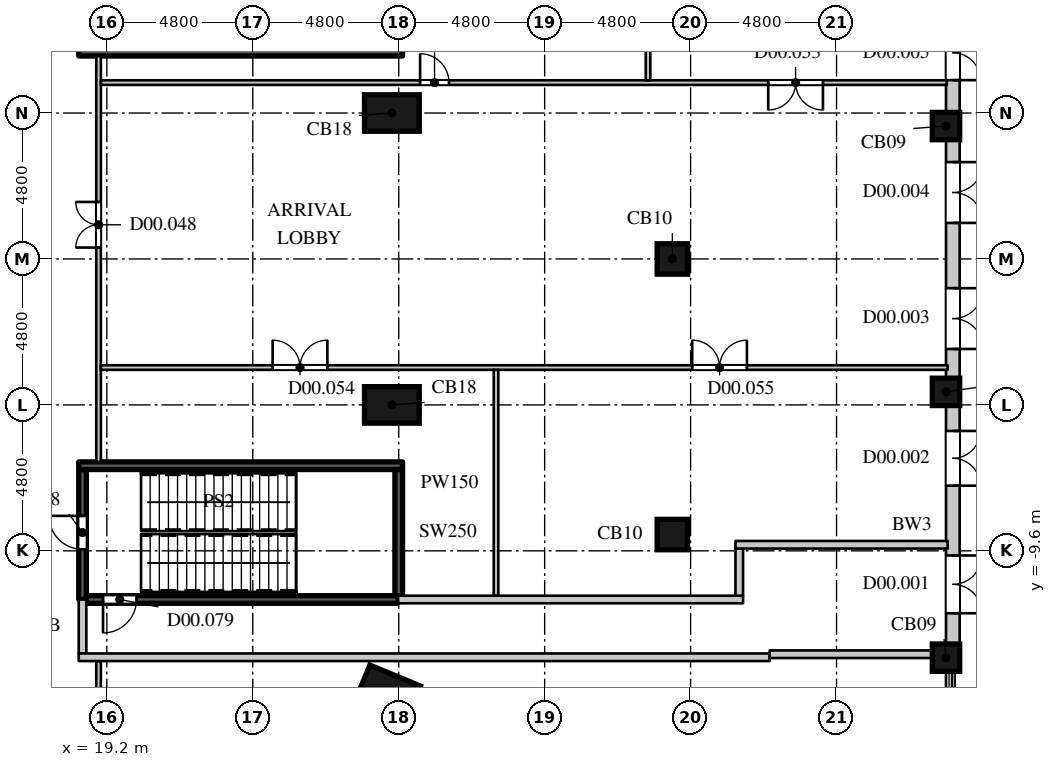
"""IFC4 building model, lengths in metres.
Left out: names, types, materials, properties, quantities, classifications, styles, units other than length and angle.
Written with IfcOpenShell. Run it as: python <this file> out.ifc"""

import sys

from ifc_helpers import new_model, si_unit, direction, frame, frame_2d, origin, origin_2d, place, context, subcontext, project, spatial, rectangle, extrude, element, fill, save


model = new_model("IFC4")
c1 = context("Model", 3, precision=1e-05, world=origin(), true_north=direction((0.0, 1.0)))
c2 = subcontext(c1, "Body", "Model", "MODEL_VIEW")
j1 = project(units=[si_unit("LENGTHUNIT", "METRE"), si_unit("PLANEANGLEUNIT", "RADIAN")], contexts=[c1])
p1 = place(None, origin())
s1 = spatial("IfcSite", under=j1, at=p1, CompositionType="ELEMENT")
p2 = place(p1, origin())
s2 = spatial("IfcBuilding", under=s1, at=p2, CompositionType="ELEMENT")
p3 = place(p2, origin())
s3 = spatial("IfcBuildingStorey", under=s2, at=p3, CompositionType="ELEMENT", Elevation=0.0)
p4 = place(p3, frame((28.454, -14.257, 0.0), z_axis=(0.0, 0.0, 1.0), x_axis=(0.382683496864, 0.923879505795, 0.0)))
e1 = element("IfcColumn", 1, at=p4, inside=s3, PredefinedType="COLUMN", context=c2, shape_type="SweptSolid", body=[
    extrude(rectangle(XDim=1.2, YDim=1.8, at=origin_2d()), origin(), (0.0, 0.0, 1.0), 6.0),
])
p5 = place(p3, frame((46.8, -13.114, 0.0), z_axis=(0.0, 0.0, 1.0), x_axis=(1.0, 0.0, 0.0)))
e2 = element("IfcColumn", 2, at=p5, inside=s3, PredefinedType="COLUMN", context=c2, shape_type="SweptSolid", body=[
    extrude(rectangle(XDim=0.9, YDim=0.9, at=origin_2d()), origin(), (0.0, 0.0, 1.0), 6.0),
])
p6 = place(p3, frame((37.8, -9.064, 0.0), z_axis=(0.0, 0.0, 1.0), x_axis=(1.0, 0.0, 0.0)))
e3 = element("IfcColumn", 3, at=p6, inside=s3, PredefinedType="COLUMN", context=c2, shape_type="SweptSolid", body=[
    extrude(rectangle(XDim=1.0, YDim=1.0, at=origin_2d()), origin(), (0.0, 0.0, 1.0), 6.0),
])
p7 = place(p3, frame((28.575, -4.8, 0.0), z_axis=(0.0, 0.0, 1.0), x_axis=(0.0, 1.0, 0.0)))
e4 = element("IfcColumn", 4, at=p7, inside=s3, PredefinedType="COLUMN", context=c2, shape_type="SweptSolid", body=[
    extrude(rectangle(XDim=1.2, YDim=1.8, at=origin_2d()), origin(), (0.0, 0.0, 1.0), 6.0),
])
p8 = place(p3, frame((46.8, -4.371, 0.0), z_axis=(0.0, 0.0, 1.0), x_axis=(1.0, 0.0, 0.0)))
e5 = element("IfcColumn", 5, at=p8, inside=s3, PredefinedType="COLUMN", context=c2, shape_type="SweptSolid", body=[
    extrude(rectangle(XDim=0.9, YDim=0.9, at=origin_2d()), origin(), (0.0, 0.0, 1.0), 6.0),
])
p9 = place(p3, frame((37.8, 0.0, 0.0), z_axis=(0.0, 0.0, 1.0), x_axis=(1.0, 0.0, 0.0)))
e6 = element("IfcColumn", 6, at=p9, inside=s3, PredefinedType="COLUMN", context=c2, shape_type="SweptSolid", body=[
    extrude(rectangle(XDim=1.0, YDim=1.0, at=origin_2d()), origin(), (0.0, 0.0, 1.0), 6.0),
])
p10 = place(p3, frame((46.8, 4.371, 0.0), z_axis=(0.0, 0.0, 1.0), x_axis=(1.0, 0.0, 0.0)))
e7 = element("IfcColumn", 7, at=p10, inside=s3, PredefinedType="COLUMN", context=c2, shape_type="SweptSolid", body=[
    extrude(rectangle(XDim=0.9, YDim=0.9, at=origin_2d()), origin(), (0.0, 0.0, 1.0), 6.0),
])
p11 = place(p3, frame((28.575, 4.8, 0.0), z_axis=(0.0, 0.0, 1.0), x_axis=(0.0, 1.0, 0.0)))
e8 = element("IfcColumn", 8, at=p11, inside=s3, PredefinedType="COLUMN", context=c2, shape_type="SweptSolid", body=[
    extrude(rectangle(XDim=1.2, YDim=1.8, at=origin_2d()), origin(), (0.0, 0.0, 1.0), 6.0),
])
p12 = place(p3, frame((47.025, -12.664, 0.0), z_axis=(0.0, 0.0, 1.0), x_axis=(0.0, 1.0, 0.0)))
e9 = element("IfcWall", 9, at=p12, inside=s3, PredefinedType="ELEMENTEDWALL", context=c2, shape_type="SweptSolid", body=[
    extrude(rectangle(XDim=7.842, YDim=0.45, at=frame_2d((3.921, 0.0))), origin(), (0.0, 0.0, 1.0), 4.8),
])
p13 = place(p12, frame((1.01, 0.0, 0.0)))
e10 = element("IfcOpeningElement", 10, at=p13, cuts=e9, PredefinedType="OPENING", context=c2, shape_type="SweptSolid", body=[
    extrude(rectangle(XDim=1.9, YDim=2.7, at=frame_2d((0.95, 1.35))), frame((0.0, 0.235, 0.0), z_axis=(0.0, -1.0, 0.0), x_axis=(1.0, 0.0, 0.0)), (0.0, 0.0, 1.0), 0.47),
])
p14 = place(p12, frame((5.207, 0.0, 0.0)))
e11 = element("IfcOpeningElement", 11, at=p14, cuts=e9, PredefinedType="OPENING", context=c2, shape_type="SweptSolid", body=[
    extrude(rectangle(XDim=1.8, YDim=2.7, at=frame_2d((0.9, 1.35))), frame((0.0, 0.235, 0.0), z_axis=(0.0, -1.0, 0.0), x_axis=(1.0, 0.0, 0.0)), (0.0, 0.0, 1.0), 0.47),
])
p15 = place(p3, frame((47.025, -3.921, 0.0), z_axis=(0.0, 0.0, 1.0), x_axis=(0.0, 1.0, 0.0)))
e12 = element("IfcWall", 12, at=p15, inside=s3, PredefinedType="ELEMENTEDWALL", context=c2, shape_type="SweptSolid", body=[
    extrude(rectangle(XDim=7.842, YDim=0.45, at=frame_2d((3.921, 0.0))), origin(), (0.0, 0.0, 1.0), 4.8),
])
p16 = place(p15, frame((0.961, 0.0, 0.0)))
e13 = element("IfcOpeningElement", 13, at=p16, cuts=e12, PredefinedType="OPENING", context=c2, shape_type="SweptSolid", body=[
    extrude(rectangle(XDim=2.0, YDim=2.7, at=frame_2d((1.0, 1.35))), frame((0.0, 0.235, 0.0), z_axis=(0.0, -1.0, 0.0), x_axis=(1.0, 0.0, 0.0)), (0.0, 0.0, 1.0), 0.47),
])
p17 = place(p15, frame((5.107, 0.0, 0.0)))
e14 = element("IfcOpeningElement", 14, at=p17, cuts=e12, PredefinedType="OPENING", context=c2, shape_type="SweptSolid", body=[
    extrude(rectangle(XDim=2.0, YDim=2.7, at=frame_2d((1.0, 1.35))), frame((0.0, 0.235, 0.0), z_axis=(0.0, -1.0, 0.0), x_axis=(1.0, 0.0, 0.0)), (0.0, 0.0, 1.0), 0.47),
])
p18 = place(p3, frame((47.025, 4.821, 0.0), z_axis=(0.0, 0.0, 1.0), x_axis=(0.0, 1.0, 0.0)))
e15 = element("IfcWall", 15, at=p18, inside=s3, PredefinedType="ELEMENTEDWALL", context=c2, shape_type="SweptSolid", body=[
    extrude(rectangle(XDim=7.842, YDim=0.45, at=frame_2d((3.921, 0.0))), origin(), (0.0, 0.0, 1.0), 4.8),
])
p19 = place(p18, frame((1.061, 0.0, 0.0)))
e16 = element("IfcOpeningElement", 16, at=p19, cuts=e15, PredefinedType="OPENING", context=c2, shape_type="SweptSolid", body=[
    extrude(rectangle(XDim=1.8, YDim=2.7, at=frame_2d((0.9, 1.35))), frame((0.0, 0.235, 0.0), z_axis=(0.0, -1.0, 0.0), x_axis=(1.0, 0.0, 0.0)), (0.0, 0.0, 1.0), 0.47),
])
p20 = place(p18, frame((5.157, 0.0, 0.0)))
e17 = element("IfcOpeningElement", 17, at=p20, cuts=e15, PredefinedType="OPENING", context=c2, shape_type="SweptSolid", body=[
    extrude(rectangle(XDim=1.9, YDim=2.7, at=frame_2d((0.95, 1.35))), frame((0.0, 0.235, 0.0), z_axis=(0.0, -1.0, 0.0), x_axis=(1.0, 0.0, 0.0)), (0.0, 0.0, 1.0), 0.47),
])
p21 = place(p3, frame((18.928, -29.9, 0.0), z_axis=(0.0, 0.0, 1.0), x_axis=(0.0, 1.0, 0.0)))
e18 = element("IfcWall", 18, at=p21, inside=s3, PredefinedType="PARTITIONING", context=c2, shape_type="SweptSolid", body=[
    extrude(rectangle(XDim=16.675, YDim=0.15, at=frame_2d((8.337, 0.0))), origin(), (0.0, 0.0, 1.0), 5.65),
])
p22 = place(p3, frame((18.928, -6.675, 0.0), z_axis=(0.0, 0.0, 1.0), x_axis=(0.0, 1.0, 0.0)))
e19 = element("IfcWall", 19, at=p22, inside=s3, PredefinedType="PARTITIONING", context=c2, shape_type="SweptSolid", body=[
    extrude(rectangle(XDim=13.35, YDim=0.15, at=frame_2d((6.675, 0.0))), origin(), (0.0, 0.0, 1.0), 5.65),
])
p23 = place(p22, frame((7.05, 0.0, 0.0)))
e20 = element("IfcOpeningElement", 20, at=p23, cuts=e19, PredefinedType="OPENING", context=c2, shape_type="SweptSolid", body=[
    extrude(rectangle(XDim=1.5, YDim=2.2, at=frame_2d((0.75, 1.1))), frame((0.0, 0.085, 0.0), z_axis=(0.0, -1.0, 0.0), x_axis=(1.0, 0.0, 0.0)), (0.0, 0.0, 1.0), 0.17),
])
p24 = place(p3, frame((19.003, -3.571, 0.0), z_axis=(0.0, 0.0, 1.0), x_axis=(1.0, 0.0, 0.0)))
e21 = element("IfcWall", 21, at=p24, inside=s3, PredefinedType="PARTITIONING", context=c2, shape_type="SweptSolid", body=[
    extrude(rectangle(XDim=27.852, YDim=0.15, at=frame_2d((13.926, 0.0))), origin(), (0.0, 0.0, 1.0), 5.65),
])
p25 = place(p24, frame((5.65, 0.0, 0.0)))
e22 = element("IfcOpeningElement", 22, at=p25, cuts=e21, PredefinedType="OPENING", context=c2, shape_type="SweptSolid", body=[
    extrude(rectangle(XDim=1.8, YDim=2.4, at=frame_2d((0.9, 1.2))), frame((0.0, 0.085, 0.0), z_axis=(0.0, -1.0, 0.0), x_axis=(1.0, 0.0, 0.0)), (0.0, 0.0, 1.0), 0.17),
])
p26 = place(p24, frame((19.45, 0.0, 0.0)))
e23 = element("IfcOpeningElement", 23, at=p26, cuts=e21, PredefinedType="OPENING", context=c2, shape_type="SweptSolid", body=[
    extrude(rectangle(XDim=1.8, YDim=2.4, at=frame_2d((0.9, 1.2))), frame((0.0, 0.085, 0.0), z_axis=(0.0, -1.0, 0.0), x_axis=(1.0, 0.0, 0.0)), (0.0, 0.0, 1.0), 0.17),
])
p27 = place(p3, frame((19.003, 5.8, 0.0), z_axis=(0.0, 0.0, 1.0), x_axis=(1.0, 0.0, 0.0)))
e24 = element("IfcWall", 24, at=p27, inside=s3, PredefinedType="PARTITIONING", context=c2, shape_type="SweptSolid", body=[
    extrude(rectangle(XDim=27.822, YDim=0.15, at=frame_2d((13.911, 0.0))), origin(), (0.0, 0.0, 1.0), 5.65),
])
p28 = place(p27, frame((21.95, 0.0, 0.0)))
e25 = element("IfcOpeningElement", 25, at=p28, cuts=e24, PredefinedType="OPENING", context=c2, shape_type="SweptSolid", body=[
    extrude(rectangle(XDim=1.8, YDim=2.4, at=frame_2d((0.9, 1.2))), frame((0.0, 0.085, 0.0), z_axis=(0.0, -1.0, 0.0), x_axis=(1.0, 0.0, 0.0)), (0.0, 0.0, 1.0), 0.17),
])
p29 = place(p27, frame((10.5, 0.0, 0.0)))
e26 = element("IfcOpeningElement", 26, at=p29, cuts=e24, PredefinedType="OPENING", context=c2, shape_type="SweptSolid", body=[
    extrude(rectangle(XDim=0.95, YDim=2.2, at=frame_2d((0.475, 1.1))), frame((0.0, 0.085, 0.0), z_axis=(0.0, -1.0, 0.0), x_axis=(1.0, 0.0, 0.0)), (0.0, 0.0, 1.0), 0.17),
])
p30 = place(p3, frame((32.0, -11.075, 0.0), z_axis=(0.0, 0.0, 1.0), x_axis=(0.0, 1.0, 0.0)))
e27 = element("IfcWall", 27, at=p30, inside=s3, PredefinedType="PARTITIONING", context=c2, shape_type="SweptSolid", body=[
    extrude(rectangle(XDim=7.429, YDim=0.15, at=frame_2d((3.714, 0.0))), origin(), (0.0, 0.0, 1.0), 5.65),
])
p31 = place(p3, frame((37.0, 5.875, 0.0), z_axis=(0.0, 0.0, 1.0), x_axis=(0.0, 1.0, 0.0)))
e28 = element("IfcWall", 28, at=p31, inside=s3, PredefinedType="PARTITIONING", context=c2, shape_type="SweptSolid", body=[
    extrude(rectangle(XDim=4.95, YDim=0.15, at=frame_2d((2.475, 0.0))), origin(), (0.0, 0.0, 1.0), 5.65),
])
p32 = place(p3, frame((18.4, -11.2, 0.0), z_axis=(0.0, 0.0, 1.0), x_axis=(0.0, 1.0, 0.0)))
e29 = element("IfcWall", 29, at=p32, inside=s3, PredefinedType="SHEAR", context=c2, shape_type="SweptSolid", body=[
    extrude(rectangle(XDim=4.275, YDim=0.25, at=frame_2d((2.137, 0.0))), origin(), (0.0, 0.0, 1.0), 5.65),
])
p33 = place(p32, frame((1.65, 0.0, 0.0)))
e30 = element("IfcOpeningElement", 30, at=p33, cuts=e29, PredefinedType="OPENING", context=c2, shape_type="SweptSolid", body=[
    extrude(rectangle(XDim=1.1, YDim=2.2, at=frame_2d((0.55, 1.1))), frame((0.0, 0.135, 0.0), z_axis=(0.0, -1.0, 0.0), x_axis=(1.0, 0.0, 0.0)), (0.0, 0.0, 1.0), 0.27),
])
p34 = place(p3, frame((18.525, -11.2, 0.0), z_axis=(0.0, 0.0, 1.0), x_axis=(1.0, 0.0, 0.0)))
e31 = element("IfcWall", 31, at=p34, inside=s3, PredefinedType="SHEAR", context=c2, shape_type="SweptSolid", body=[
    extrude(rectangle(XDim=10.255, YDim=0.25, at=frame_2d((5.127, 0.0))), origin(), (0.0, 0.0, 1.0), 5.65),
])
p35 = place(p34, frame((0.55, 0.0, 0.0)))
e32 = element("IfcOpeningElement", 32, at=p35, cuts=e31, PredefinedType="OPENING", context=c2, shape_type="SweptSolid", body=[
    extrude(rectangle(XDim=1.1, YDim=2.2, at=frame_2d((0.55, 1.1))), frame((0.0, 0.135, 0.0), z_axis=(0.0, -1.0, 0.0), x_axis=(1.0, 0.0, 0.0)), (0.0, 0.0, 1.0), 0.27),
])
for number, where, z_axis, x_axis in (
    (33, (18.275, -6.8, 0.0), (0.0, 0.0, 1.0), (1.0, 0.0, 0.0)),
    (34, (18.275, 6.8, 0.0), (0.0, 0.0, 1.0), (1.0, 0.0, 0.0)),
):
    element("IfcWall", number, at=place(p3, frame(where, z_axis=z_axis, x_axis=x_axis)), inside=s3, PredefinedType="SHEAR", context=c2, shape_type="SweptSolid", body=[
        extrude(rectangle(XDim=10.65, YDim=0.25, at=frame_2d((5.325, 0.0))), origin(), (0.0, 0.0, 1.0), 5.65),
    ])
p36 = place(p3, frame((28.8, -11.075, 0.0), z_axis=(0.0, 0.0, 1.0), x_axis=(0.0, 1.0, 0.0)))
e35 = element("IfcWall", 35, at=p36, inside=s3, PredefinedType="SHEAR", context=c2, shape_type="SweptSolid", body=[
    extrude(rectangle(XDim=4.15, YDim=0.25, at=frame_2d((2.075, 0.0))), origin(), (0.0, 0.0, 1.0), 5.65),
])
p37 = place(p3, frame((18.4, -12.975, 0.0), z_axis=(0.0, 0.0, 1.0), x_axis=(0.0, 1.0, 0.0)))
e36 = element("IfcWall", 36, at=p37, inside=s3, PredefinedType="PARTITIONING", context=c2, shape_type="SweptSolid", body=[
    extrude(rectangle(XDim=1.775, YDim=0.25, at=frame_2d((0.888, 0.0))), origin(), (0.0, 0.0, 1.0), 5.65),
])
p38 = place(p3, frame((18.275, -13.1, 0.0), z_axis=(0.0, 0.0, 1.0), x_axis=(1.0, 0.0, 0.0)))
e37 = element("IfcWall", 37, at=p38, inside=s3, PredefinedType="PARTITIONING", context=c2, shape_type="SweptSolid", body=[
    extrude(rectangle(XDim=22.725, YDim=0.25, at=frame_2d((11.363, 0.0))), origin(), (0.0, 0.0, 1.0), 5.65),
])
p39 = place(p3, frame((28.78, -11.2, 0.0), z_axis=(0.0, 0.0, 1.0), x_axis=(1.0, 0.0, 0.0)))
e38 = element("IfcWall", 38, at=p39, inside=s3, PredefinedType="PARTITIONING", context=c2, shape_type="SweptSolid", body=[
    extrude(rectangle(XDim=11.345, YDim=0.25, at=frame_2d((5.672, 0.0))), origin(), (0.0, 0.0, 1.0), 5.65),
])
p40 = place(p3, frame((40.0, -11.075, 0.0), z_axis=(0.0, 0.0, 1.0), x_axis=(0.0, 1.0, 0.0)))
e39 = element("IfcWall", 39, at=p40, inside=s3, PredefinedType="PARTITIONING", context=c2, shape_type="SweptSolid", body=[
    extrude(rectangle(XDim=1.55, YDim=0.25, at=frame_2d((0.775, 0.0))), origin(), (0.0, 0.0, 1.0), 5.65),
])
p41 = place(p3, frame((39.875, -9.4, 0.0), z_axis=(0.0, 0.0, 1.0), x_axis=(1.0, 0.0, 0.0)))
e40 = element("IfcWall", 40, at=p41, inside=s3, PredefinedType="PARTITIONING", context=c2, shape_type="SweptSolid", body=[
    extrude(rectangle(XDim=6.98, YDim=0.25, at=frame_2d((3.49, 0.0))), origin(), (0.0, 0.0, 1.0), 5.65),
])
p42 = place(p3, frame((41.0, -13.0, 0.0), z_axis=(0.0, 0.0, 1.0), x_axis=(1.0, 0.0, 0.0)))
e41 = element("IfcWall", 41, at=p42, inside=s3, PredefinedType="PARTITIONING", context=c2, shape_type="SweptSolid", body=[
    extrude(rectangle(XDim=5.35, YDim=0.25, at=frame_2d((2.675, 0.0))), origin(), (0.0, 0.0, 1.0), 5.65),
])
p43 = place(p13, frame((1.9, 0.0, 0.0), z_axis=(0.0, 0.0, 1.0), x_axis=(-1.0, 0.0, 0.0)))
e42 = element("IfcDoor", 42, at=p43, inside=s3, OperationType="DOUBLE_DOOR_SINGLE_SWING", PredefinedType="DOOR", context=c2, shape_type="SweptSolid", body=[
    extrude(rectangle(XDim=1.9, YDim=2.7, at=frame_2d((0.95, 1.35))), frame((0.0, -0.08, 0.0), z_axis=(0.0, -1.0, 0.0), x_axis=(1.0, 0.0, 0.0)), (0.0, 0.0, 1.0), 0.05),
])
fill(e10, e42)
p44 = place(p14, frame((1.8, 0.0, 0.0), z_axis=(0.0, 0.0, 1.0), x_axis=(-1.0, 0.0, 0.0)))
e43 = element("IfcDoor", 43, at=p44, inside=s3, OperationType="DOUBLE_DOOR_SINGLE_SWING", PredefinedType="DOOR", context=c2, shape_type="SweptSolid", body=[
    extrude(rectangle(XDim=1.8, YDim=2.7, at=frame_2d((0.9, 1.35))), frame((0.0, -0.08, 0.0), z_axis=(0.0, -1.0, 0.0), x_axis=(1.0, 0.0, 0.0)), (0.0, 0.0, 1.0), 0.05),
])
fill(e11, e43)
p45 = place(p16, frame((2.0, 0.0, 0.0), z_axis=(0.0, 0.0, 1.0), x_axis=(-1.0, 0.0, 0.0)))
e44 = element("IfcDoor", 44, at=p45, inside=s3, OperationType="DOUBLE_DOOR_SINGLE_SWING", PredefinedType="DOOR", context=c2, shape_type="SweptSolid", body=[
    extrude(rectangle(XDim=2.0, YDim=2.7, at=frame_2d((1.0, 1.35))), frame((0.0, -0.08, 0.0), z_axis=(0.0, -1.0, 0.0), x_axis=(1.0, 0.0, 0.0)), (0.0, 0.0, 1.0), 0.05),
])
fill(e13, e44)
p46 = place(p17, frame((2.0, 0.0, 0.0), z_axis=(0.0, 0.0, 1.0), x_axis=(-1.0, 0.0, 0.0)))
e45 = element("IfcDoor", 45, at=p46, inside=s3, OperationType="DOUBLE_DOOR_SINGLE_SWING", PredefinedType="DOOR", context=c2, shape_type="SweptSolid", body=[
    extrude(rectangle(XDim=2.0, YDim=2.7, at=frame_2d((1.0, 1.35))), frame((0.0, -0.08, 0.0), z_axis=(0.0, -1.0, 0.0), x_axis=(1.0, 0.0, 0.0)), (0.0, 0.0, 1.0), 0.05),
])
fill(e14, e45)
p47 = place(p19, frame((1.8, 0.0, 0.0), z_axis=(0.0, 0.0, 1.0), x_axis=(-1.0, 0.0, 0.0)))
e46 = element("IfcDoor", 46, at=p47, inside=s3, OperationType="DOUBLE_DOOR_SINGLE_SWING", PredefinedType="DOOR", context=c2, shape_type="SweptSolid", body=[
    extrude(rectangle(XDim=1.8, YDim=2.7, at=frame_2d((0.9, 1.35))), frame((0.0, -0.08, 0.0), z_axis=(0.0, -1.0, 0.0), x_axis=(1.0, 0.0, 0.0)), (0.0, 0.0, 1.0), 0.05),
])
fill(e16, e46)
p48 = place(p23, origin())
e47 = element("IfcDoor", 47, at=p48, inside=s3, OperationType="DOUBLE_DOOR_SINGLE_SWING", PredefinedType="DOOR", context=c2, shape_type="SweptSolid", body=[
    extrude(rectangle(XDim=1.5, YDim=2.2, at=frame_2d((0.75, 1.1))), frame((0.0, 0.025, 0.0), z_axis=(0.0, -1.0, 0.0), x_axis=(1.0, 0.0, 0.0)), (0.0, 0.0, 1.0), 0.05),
])
fill(e20, e47)
p49 = place(p28, origin())
e48 = element("IfcDoor", 48, at=p49, inside=s3, OperationType="DOUBLE_DOOR_SINGLE_SWING", PredefinedType="DOOR", context=c2, shape_type="SweptSolid", body=[
    extrude(rectangle(XDim=1.8, YDim=2.4, at=frame_2d((0.9, 1.2))), frame((0.0, 0.025, 0.0), z_axis=(0.0, -1.0, 0.0), x_axis=(1.0, 0.0, 0.0)), (0.0, 0.0, 1.0), 0.05),
])
fill(e25, e48)
p50 = place(p25, origin())
e49 = element("IfcDoor", 49, at=p50, inside=s3, OperationType="DOUBLE_DOOR_SINGLE_SWING", PredefinedType="DOOR", context=c2, shape_type="SweptSolid", body=[
    extrude(rectangle(XDim=1.8, YDim=2.4, at=frame_2d((0.9, 1.2))), frame((0.0, 0.025, 0.0), z_axis=(0.0, -1.0, 0.0), x_axis=(1.0, 0.0, 0.0)), (0.0, 0.0, 1.0), 0.05),
])
fill(e22, e49)
p51 = place(p26, origin())
e50 = element("IfcDoor", 50, at=p51, inside=s3, OperationType="DOUBLE_DOOR_SINGLE_SWING", PredefinedType="DOOR", context=c2, shape_type="SweptSolid", body=[
    extrude(rectangle(XDim=1.8, YDim=2.4, at=frame_2d((0.9, 1.2))), frame((0.0, 0.025, 0.0), z_axis=(0.0, -1.0, 0.0), x_axis=(1.0, 0.0, 0.0)), (0.0, 0.0, 1.0), 0.05),
])
fill(e23, e50)
p52 = place(p29, origin())
e51 = element("IfcDoor", 51, at=p52, inside=s3, OperationType="SINGLE_SWING_LEFT", PredefinedType="DOOR", context=c2, shape_type="SweptSolid", body=[
    extrude(rectangle(XDim=0.95, YDim=2.2, at=frame_2d((0.475, 1.1))), frame((0.0, 0.025, 0.0), z_axis=(0.0, -1.0, 0.0), x_axis=(1.0, 0.0, 0.0)), (0.0, 0.0, 1.0), 0.05),
])
fill(e26, e51)
p53 = place(p33, origin())
e52 = element("IfcDoor", 52, at=p53, inside=s3, OperationType="SINGLE_SWING_RIGHT", PredefinedType="DOOR", context=c2, shape_type="SweptSolid", body=[
    extrude(rectangle(XDim=1.1, YDim=2.2, at=frame_2d((0.55, 1.1))), frame((0.0, 0.025, 0.0), z_axis=(0.0, -1.0, 0.0), x_axis=(1.0, 0.0, 0.0)), (0.0, 0.0, 1.0), 0.05),
])
fill(e30, e52)
p54 = place(p35, origin())
e53 = element("IfcDoor", 53, at=p54, inside=s3, OperationType="SINGLE_SWING_RIGHT", PredefinedType="DOOR", context=c2, shape_type="SweptSolid", body=[
    extrude(rectangle(XDim=1.1, YDim=2.2, at=frame_2d((0.55, 1.1))), frame((0.0, 0.025, 0.0), z_axis=(0.0, -1.0, 0.0), x_axis=(1.0, 0.0, 0.0)), (0.0, 0.0, 1.0), 0.05),
])
fill(e32, e53)
save(model, sys.argv[1])
